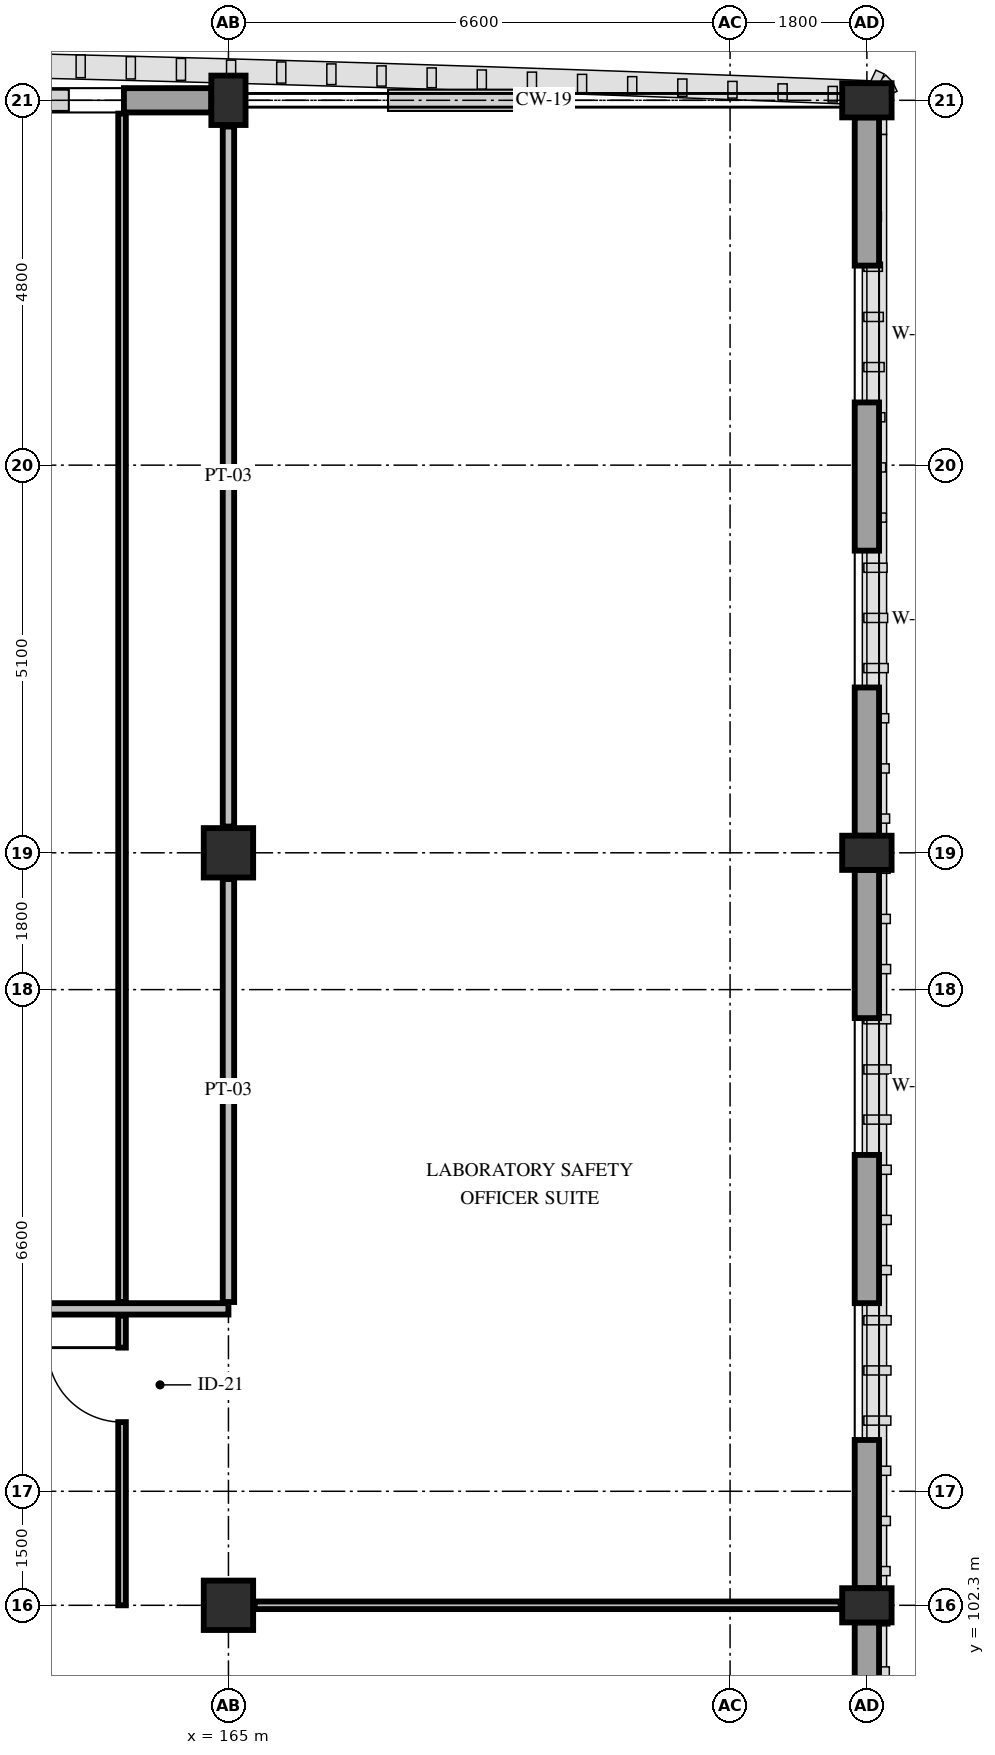
"""IFC4 building model, lengths in metres.
Left out: names, types, materials, properties, quantities, classifications, styles, units other than length and angle.
Written with IfcOpenShell. Run it as: python <this file> out.ifc"""

import sys

from ifc_helpers import new_model, si_unit, direction, frame, frame_2d, origin, origin_2d, place, context, subcontext, project, spatial, rectangle, extrude, element, fill, save


model = new_model("IFC4")
c1 = context("Model", 3, precision=1e-05, world=origin(), true_north=direction((0.0, 1.0)))
c2 = subcontext(c1, "Body", "Model", "MODEL_VIEW")
j1 = project(units=[si_unit("LENGTHUNIT", "METRE"), si_unit("PLANEANGLEUNIT", "RADIAN")], contexts=[c1])
p1 = place(None, origin())
s1 = spatial("IfcSite", under=j1, at=p1, CompositionType="ELEMENT")
p2 = place(p1, origin())
s2 = spatial("IfcBuilding", under=s1, at=p2, CompositionType="ELEMENT")
p3 = place(p2, frame((0.0, 0.0, 29.4)))
s3 = spatial("IfcBuildingStorey", under=s2, at=p3, CompositionType="ELEMENT", Elevation=29.4)
for number, where, z_axis, x_axis in (
    (1, (165.0, 102.3, 0.0), (0.0, 0.0, 1.0), (1.0, 0.0, 0.0)),
    (2, (165.0, 112.2, 0.0), (0.0, 0.0, 1.0), (1.0, 0.0, 0.0)),
):
    element("IfcColumn", number, at=place(p3, frame(where, z_axis=z_axis, x_axis=x_axis)), inside=s3, PredefinedType="COLUMN", context=c2, shape_type="SweptSolid", body=[
        extrude(rectangle(XDim=0.65, YDim=0.65, at=origin_2d()), origin(), (0.0, 0.0, 1.0), 4.8),
    ])
for number, where, z_axis, x_axis in (
    (3, (165.0, 122.1, 0.0), (0.0, 0.0, 1.0), (1.0, 0.0, 0.0)),
    (4, (173.4, 102.3, 0.0), (0.0, 0.0, 1.0), (0.0, 1.0, 0.0)),
    (5, (173.4, 112.2, 0.0), (0.0, 0.0, 1.0), (0.0, 1.0, 0.0)),
    (6, (173.4, 122.1, 0.0), (0.0, 0.0, 1.0), (0.0, 1.0, 0.0)),
):
    element("IfcColumn", number, at=place(p3, frame(where, z_axis=z_axis, x_axis=x_axis)), inside=s3, PredefinedType="PILASTER", context=c2, shape_type="SweptSolid", body=[
        extrude(rectangle(XDim=0.45, YDim=0.65, at=origin_2d()), origin(), (0.0, 0.0, 1.0), 4.8),
    ])
p4 = place(p3, frame((158.625, 122.1, 0.0), z_axis=(0.0, 0.0, 1.0), x_axis=(1.0, 0.0, 0.0)))
e7 = element("IfcWall", 7, at=p4, inside=s3, PredefinedType="STANDARD", context=c2, shape_type="SweptSolid", body=[
    extrude(rectangle(XDim=6.15, YDim=0.32, at=frame_2d((3.075, 0.0))), origin(), (0.0, 0.0, 1.0), 3.78),
])
p5 = place(p4, frame((1.15, 0.0, 0.85)))
e8 = element("IfcOpeningElement", 8, at=p5, cuts=e7, PredefinedType="OPENING", context=c2, shape_type="SweptSolid", body=[
    extrude(rectangle(XDim=1.35, YDim=2.08, at=frame_2d((0.675, 1.04))), frame((0.0, 0.175, 0.0), z_axis=(0.0, -1.0, 0.0), x_axis=(1.0, 0.0, 0.0)), (0.0, 0.0, 1.0), 0.35),
])
p6 = place(p4, frame((3.65, 0.0, 0.85)))
e9 = element("IfcOpeningElement", 9, at=p6, cuts=e7, PredefinedType="OPENING", context=c2, shape_type="SweptSolid", body=[
    extrude(rectangle(XDim=1.35, YDim=2.08, at=frame_2d((0.675, 1.04))), frame((0.0, 0.175, 0.0), z_axis=(0.0, -1.0, 0.0), x_axis=(1.0, 0.0, 0.0)), (0.0, 0.0, 1.0), 0.35),
])
p7 = place(p3, frame((173.4, 121.875, 0.0), z_axis=(0.0, 0.0, 1.0), x_axis=(0.0, -1.0, 0.0)))
e10 = element("IfcWall", 10, at=p7, inside=s3, PredefinedType="STANDARD", context=c2, shape_type="SweptSolid", body=[
    extrude(rectangle(XDim=9.45, YDim=0.32, at=frame_2d((4.725, 0.0))), origin(), (0.0, 0.0, 1.0), 3.83),
])
p8 = place(p7, frame((1.95, 0.0, 0.85)))
e11 = element("IfcOpeningElement", 11, at=p8, cuts=e10, PredefinedType="OPENING", context=c2, shape_type="SweptSolid", body=[
    extrude(rectangle(XDim=1.8, YDim=2.24, at=frame_2d((0.9, 1.12))), frame((0.0, 0.175, 0.0), z_axis=(0.0, -1.0, 0.0), x_axis=(1.0, 0.0, 0.0)), (0.0, 0.0, 1.0), 0.35),
])
p9 = place(p7, frame((5.7, 0.0, 0.85)))
e12 = element("IfcOpeningElement", 12, at=p9, cuts=e10, PredefinedType="OPENING", context=c2, shape_type="SweptSolid", body=[
    extrude(rectangle(XDim=1.8, YDim=2.24, at=frame_2d((0.9, 1.12))), frame((0.0, 0.175, 0.0), z_axis=(0.0, -1.0, 0.0), x_axis=(1.0, 0.0, 0.0)), (0.0, 0.0, 1.0), 0.35),
])
p10 = place(p3, frame((173.4, 111.975, 0.0), z_axis=(0.0, 0.0, 1.0), x_axis=(0.0, -1.0, 0.0)))
e13 = element("IfcWall", 13, at=p10, inside=s3, PredefinedType="STANDARD", context=c2, shape_type="SweptSolid", body=[
    extrude(rectangle(XDim=9.45, YDim=0.32, at=frame_2d((4.725, 0.0))), origin(), (0.0, 0.0, 1.0), 3.83),
])
p11 = place(p10, frame((1.95, 0.0, 0.85)))
e14 = element("IfcOpeningElement", 14, at=p11, cuts=e13, PredefinedType="OPENING", context=c2, shape_type="SweptSolid", body=[
    extrude(rectangle(XDim=1.8, YDim=2.24, at=frame_2d((0.9, 1.12))), frame((0.0, 0.175, 0.0), z_axis=(0.0, -1.0, 0.0), x_axis=(1.0, 0.0, 0.0)), (0.0, 0.0, 1.0), 0.35),
])
p12 = place(p10, frame((5.7, 0.0, 0.85)))
e15 = element("IfcOpeningElement", 15, at=p12, cuts=e13, PredefinedType="OPENING", context=c2, shape_type="SweptSolid", body=[
    extrude(rectangle(XDim=1.8, YDim=2.24, at=frame_2d((0.9, 1.12))), frame((0.0, 0.175, 0.0), z_axis=(0.0, -1.0, 0.0), x_axis=(1.0, 0.0, 0.0)), (0.0, 0.0, 1.0), 0.35),
])
p13 = place(p3, frame((173.4, 102.075, 0.0), z_axis=(0.0, 0.0, 1.0), x_axis=(0.0, -1.0, 0.0)))
e16 = element("IfcWall", 16, at=p13, inside=s3, PredefinedType="STANDARD", context=c2, shape_type="SweptSolid", body=[
    extrude(rectangle(XDim=9.45, YDim=0.32, at=frame_2d((4.725, 0.0))), origin(), (0.0, 0.0, 1.0), 3.83),
])
p14 = place(p13, frame((1.95, 0.0, 0.85)))
e17 = element("IfcOpeningElement", 17, at=p14, cuts=e16, PredefinedType="OPENING", context=c2, shape_type="SweptSolid", body=[
    extrude(rectangle(XDim=1.8, YDim=2.24, at=frame_2d((0.9, 1.12))), frame((0.0, 0.175, 0.0), z_axis=(0.0, -1.0, 0.0), x_axis=(1.0, 0.0, 0.0)), (0.0, 0.0, 1.0), 0.35),
])
p15 = place(p13, frame((5.7, 0.0, 0.85)))
e18 = element("IfcOpeningElement", 18, at=p15, cuts=e16, PredefinedType="OPENING", context=c2, shape_type="SweptSolid", body=[
    extrude(rectangle(XDim=1.8, YDim=2.24, at=frame_2d((0.9, 1.12))), frame((0.0, 0.175, 0.0), z_axis=(0.0, -1.0, 0.0), x_axis=(1.0, 0.0, 0.0)), (0.0, 0.0, 1.0), 0.35),
])
p16 = place(p3, frame((141.215, 106.2, 0.0), z_axis=(0.0, 0.0, 1.0), x_axis=(1.0, 0.0, 0.0)))
e19 = element("IfcWall", 19, at=p16, inside=s3, PredefinedType="PARTITIONING", context=c2, shape_type="SweptSolid", body=[
    extrude(rectangle(XDim=23.785, YDim=0.15, at=frame_2d((11.893, 0.0))), origin(), (0.0, 0.0, 1.0), 3.78),
])
p17 = place(p16, frame((11.355, 0.0, 0.0)))
e20 = element("IfcOpeningElement", 20, at=p17, cuts=e19, PredefinedType="OPENING", context=c2, shape_type="SweptSolid", body=[
    extrude(rectangle(XDim=1.56, YDim=2.3, at=frame_2d((0.78, 1.15))), frame((0.0, 0.09, 0.0), z_axis=(0.0, -1.0, 0.0), x_axis=(1.0, 0.0, 0.0)), (0.0, 0.0, 1.0), 0.18),
])
p18 = place(p3, frame((165.0, 106.29, 0.0), z_axis=(0.0, 0.0, 1.0), x_axis=(0.0, 1.0, 0.0)))
e21 = element("IfcWall", 21, at=p18, inside=s3, PredefinedType="PARTITIONING", context=c2, shape_type="SweptSolid", body=[
    extrude(rectangle(XDim=5.565, YDim=0.15, at=frame_2d((2.782, 0.0))), origin(), (0.0, 0.0, 1.0), 3.78),
])
p19 = place(p3, frame((165.0, 112.545, 0.0), z_axis=(0.0, 0.0, 1.0), x_axis=(0.0, 1.0, 0.0)))
e22 = element("IfcWall", 22, at=p19, inside=s3, PredefinedType="PARTITIONING", context=c2, shape_type="SweptSolid", body=[
    extrude(rectangle(XDim=9.21, YDim=0.15, at=frame_2d((4.605, 0.0))), origin(), (0.0, 0.0, 1.0), 3.78),
])
p20 = place(p3, frame((165.345, 102.3, 0.0), z_axis=(0.0, 0.0, 1.0), x_axis=(1.0, 0.0, 0.0)))
e23 = element("IfcWall", 23, at=p20, inside=s3, PredefinedType="PARTITIONING", context=c2, shape_type="SweptSolid", body=[
    extrude(rectangle(XDim=7.71, YDim=0.1, at=frame_2d((3.855, 0.0))), origin(), (0.0, 0.0, 1.0), 3.83),
])
p21 = place(p3, frame((163.6, 102.3, 0.0), z_axis=(0.0, 0.0, 1.0), x_axis=(0.0, 1.0, 0.0)))
e24 = element("IfcWall", 24, at=p21, inside=s3, PredefinedType="PARTITIONING", context=c2, shape_type="SweptSolid", body=[
    extrude(rectangle(XDim=3.81, YDim=0.1, at=frame_2d((1.905, 0.0))), origin(), (0.0, 0.0, 1.0), 4.065),
])
p22 = place(p21, frame((2.41, 0.0, 0.0)))
e25 = element("IfcOpeningElement", 25, at=p22, cuts=e24, PredefinedType="OPENING", context=c2, shape_type="SweptSolid", body=[
    extrude(rectangle(XDim=0.98, YDim=2.2, at=frame_2d((0.49, 1.1))), frame((0.0, 0.065, 0.0), z_axis=(0.0, -1.0, 0.0), x_axis=(1.0, 0.0, 0.0)), (0.0, 0.0, 1.0), 0.13),
])
p23 = place(p3, frame((163.6, 106.29, 0.0), z_axis=(0.0, 0.0, 1.0), x_axis=(0.0, 1.0, 0.0)))
e26 = element("IfcWall", 26, at=p23, inside=s3, PredefinedType="PARTITIONING", context=c2, shape_type="SweptSolid", body=[
    extrude(rectangle(XDim=15.635, YDim=0.1, at=frame_2d((7.817, 0.0))), origin(), (0.0, 0.0, 1.0), 3.93),
])
p24 = place(p6, origin())
e27 = element("IfcWindow", 27, at=p24, inside=s3, PartitioningType="SINGLE_PANEL", PredefinedType="WINDOW", context=c2, shape_type="SweptSolid", body=[
    extrude(rectangle(XDim=1.35, YDim=2.08, at=frame_2d((0.675, 1.04))), frame((0.0, 0.03, 0.0), z_axis=(0.0, -1.0, 0.0), x_axis=(1.0, 0.0, 0.0)), (0.0, 0.0, 1.0), 0.06),
])
fill(e9, e27)
p25 = place(p8, origin())
e28 = element("IfcWindow", 28, at=p25, inside=s3, PartitioningType="DOUBLE_PANEL_VERTICAL", PredefinedType="WINDOW", context=c2, shape_type="SweptSolid", body=[
    extrude(rectangle(XDim=1.8, YDim=2.24, at=frame_2d((0.9, 1.12))), frame((0.0, 0.03, 0.0), z_axis=(0.0, -1.0, 0.0), x_axis=(1.0, 0.0, 0.0)), (0.0, 0.0, 1.0), 0.06),
])
fill(e11, e28)
p26 = place(p9, origin())
e29 = element("IfcWindow", 29, at=p26, inside=s3, PartitioningType="DOUBLE_PANEL_VERTICAL", PredefinedType="WINDOW", context=c2, shape_type="SweptSolid", body=[
    extrude(rectangle(XDim=1.8, YDim=2.24, at=frame_2d((0.9, 1.12))), frame((0.0, 0.03, 0.0), z_axis=(0.0, -1.0, 0.0), x_axis=(1.0, 0.0, 0.0)), (0.0, 0.0, 1.0), 0.06),
])
fill(e12, e29)
p27 = place(p11, origin())
e30 = element("IfcWindow", 30, at=p27, inside=s3, PartitioningType="DOUBLE_PANEL_VERTICAL", PredefinedType="WINDOW", context=c2, shape_type="SweptSolid", body=[
    extrude(rectangle(XDim=1.8, YDim=2.24, at=frame_2d((0.9, 1.12))), frame((0.0, 0.03, 0.0), z_axis=(0.0, -1.0, 0.0), x_axis=(1.0, 0.0, 0.0)), (0.0, 0.0, 1.0), 0.06),
])
fill(e14, e30)
p28 = place(p12, origin())
e31 = element("IfcWindow", 31, at=p28, inside=s3, PartitioningType="DOUBLE_PANEL_VERTICAL", PredefinedType="WINDOW", context=c2, shape_type="SweptSolid", body=[
    extrude(rectangle(XDim=1.8, YDim=2.24, at=frame_2d((0.9, 1.12))), frame((0.0, 0.03, 0.0), z_axis=(0.0, -1.0, 0.0), x_axis=(1.0, 0.0, 0.0)), (0.0, 0.0, 1.0), 0.06),
])
fill(e15, e31)
p29 = place(p22, origin())
e32 = element("IfcDoor", 32, at=p29, inside=s3, OperationType="SINGLE_SWING_RIGHT", PredefinedType="DOOR", context=c2, shape_type="SweptSolid", body=[
    extrude(rectangle(XDim=0.98, YDim=2.2, at=frame_2d((0.49, 1.1))), frame((0.0, 0.025, 0.0), z_axis=(0.0, -1.0, 0.0), x_axis=(1.0, 0.0, 0.0)), (0.0, 0.0, 1.0), 0.05),
])
fill(e25, e32)
save(model, sys.argv[1])
